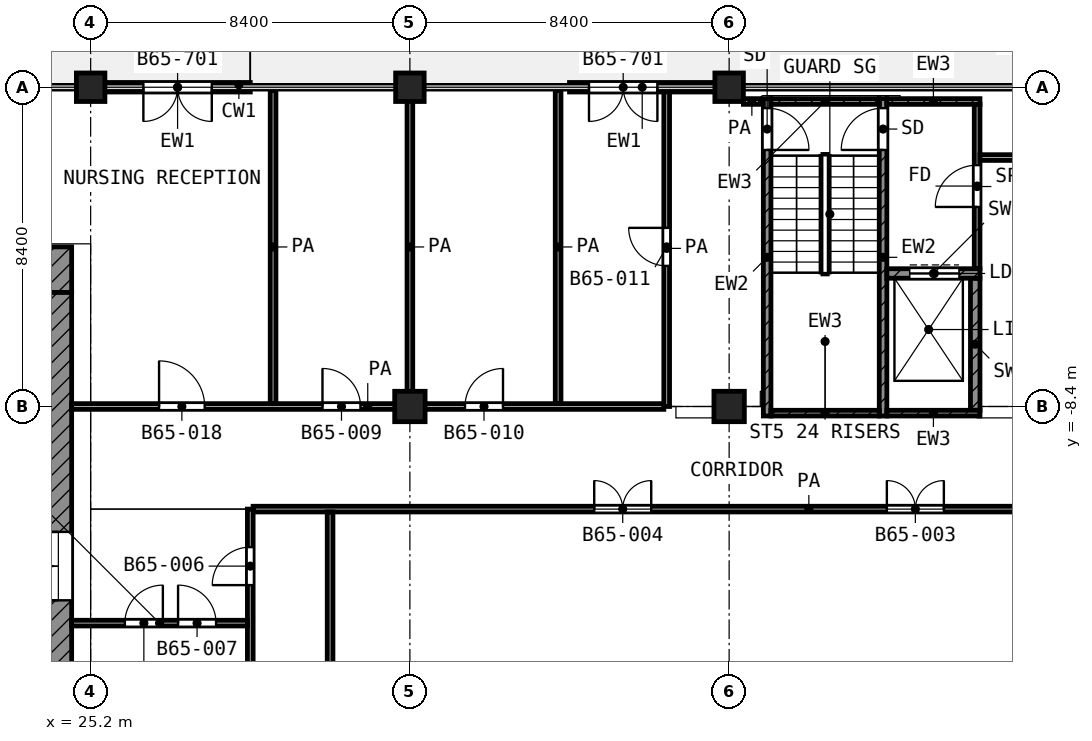
"""IFC4 building model, lengths in metres.
Left out: names, types, materials, properties, quantities, classifications, styles, units other than length and angle.
Written with IfcOpenShell. Run it as: python <this file> out.ifc"""

import sys

from ifc_helpers import new_model, si_unit, direction, frame, frame_2d, origin, origin_2d, place, context, subcontext, project, spatial, rectangle, extrude, element, fill, save


model = new_model("IFC4")
c1 = context("Model", 3, precision=1e-05, world=origin(), true_north=direction((0.0, 1.0)))
c2 = subcontext(c1, "Body", "Model", "MODEL_VIEW")
j1 = project(units=[si_unit("LENGTHUNIT", "METRE"), si_unit("PLANEANGLEUNIT", "RADIAN")], contexts=[c1])
p1 = place(None, origin())
s1 = spatial("IfcSite", under=j1, at=p1, CompositionType="ELEMENT")
p2 = place(p1, origin())
s2 = spatial("IfcBuilding", under=s1, at=p2, CompositionType="ELEMENT")
p3 = place(p2, frame((0.0, 0.0, 281.8)))
s3 = spatial("IfcBuildingStorey", under=s2, at=p3, CompositionType="ELEMENT", Elevation=281.8)
for number, where, z_axis, x_axis in (
    (1, (25.2, 0.0, 0.0), (0.0, 0.0, 1.0), (1.0, 0.0, 0.0)),
    (2, (33.6, 0.0, 0.0), (0.0, 0.0, 1.0), (1.0, 0.0, 0.0)),
    (3, (42.0, 0.0, 0.0), (0.0, 0.0, 1.0), (1.0, 0.0, 0.0)),
):
    element("IfcColumn", number, at=place(p3, frame(where, z_axis=z_axis, x_axis=x_axis)), inside=s3, PredefinedType="COLUMN", context=c2, shape_type="SweptSolid", body=[
        extrude(rectangle(XDim=0.75, YDim=0.75, at=origin_2d()), origin(), (0.0, 0.0, 1.0), 4.2),
    ])
for number, where, z_axis, x_axis in (
    (4, (33.6, -8.4, 0.0), (0.0, 0.0, 1.0), (1.0, 0.0, 0.0)),
    (5, (42.0, -8.4, 0.0), (0.0, 0.0, 1.0), (1.0, 0.0, 0.0)),
):
    element("IfcColumn", number, at=place(p3, frame(where, z_axis=z_axis, x_axis=x_axis)), inside=s3, PredefinedType="COLUMN", context=c2, shape_type="SweptSolid", body=[
        extrude(rectangle(XDim=0.8, YDim=0.8, at=origin_2d()), origin(), (0.0, 0.0, 1.0), 4.2),
    ])
p4 = place(p3, frame((41.625, 0.0, 0.0), z_axis=(0.0, 0.0, 1.0), x_axis=(-1.0, 0.0, 0.0)))
e6 = element("IfcWall", 6, at=p4, inside=s3, PredefinedType="SOLIDWALL", context=c2, shape_type="SweptSolid", body=[
    extrude(rectangle(XDim=3.825, YDim=0.25, at=frame_2d((1.913, 0.0))), origin(), (0.0, 0.0, 1.0), 3.48),
])
p5 = place(p4, frame((1.512, 0.0, 0.0)))
e7 = element("IfcOpeningElement", 7, at=p5, cuts=e6, PredefinedType="OPENING", context=c2, shape_type="SweptSolid", body=[
    extrude(rectangle(XDim=1.8, YDim=2.1, at=frame_2d((0.9, 1.05))), frame((0.0, 0.135, 0.0), z_axis=(0.0, -1.0, 0.0), x_axis=(1.0, 0.0, 0.0)), (0.0, 0.0, 1.0), 0.27),
])
p6 = place(p3, frame((29.4, 0.0, 0.0), z_axis=(0.0, 0.0, 1.0), x_axis=(-1.0, 0.0, 0.0)))
e8 = element("IfcWall", 8, at=p6, inside=s3, PredefinedType="SOLIDWALL", context=c2, shape_type="SweptSolid", body=[
    extrude(rectangle(XDim=3.825, YDim=0.25, at=frame_2d((1.913, 0.0))), origin(), (0.0, 0.0, 1.0), 3.48),
])
p7 = place(p6, frame((1.012, 0.0, 0.0)))
e9 = element("IfcOpeningElement", 9, at=p7, cuts=e8, PredefinedType="OPENING", context=c2, shape_type="SweptSolid", body=[
    extrude(rectangle(XDim=1.8, YDim=2.1, at=frame_2d((0.9, 1.05))), frame((0.0, 0.135, 0.0), z_axis=(0.0, -1.0, 0.0), x_axis=(1.0, 0.0, 0.0)), (0.0, 0.0, 1.0), 0.27),
])
p8 = place(p3, frame((4.2, -4.8, 0.0), z_axis=(0.0, 0.0, 1.0), x_axis=(1.0, 0.0, 0.0)))
e10 = element("IfcWall", 10, at=p8, inside=s3, PredefinedType="SHEAR", context=c2, shape_type="SweptSolid", body=[
    extrude(rectangle(XDim=20.5, YDim=1.2, at=frame_2d((10.25, 0.0))), origin(), (0.0, 0.0, 1.0), 3.6),
])
p9 = place(p8, frame((1.95, 0.0, 0.0)))
e11 = element("IfcOpeningElement", 11, at=p9, cuts=e10, PredefinedType="OPENING", context=c2, shape_type="SweptSolid", body=[
    extrude(rectangle(XDim=1.1, YDim=2.1, at=frame_2d((0.55, 1.05))), frame((0.0, 0.61, 0.0), z_axis=(0.0, -1.0, 0.0), x_axis=(1.0, 0.0, 0.0)), (0.0, 0.0, 1.0), 1.22),
])
p10 = place(p8, frame((17.95, 0.0, 0.0)))
e12 = element("IfcOpeningElement", 12, at=p10, cuts=e10, PredefinedType="OPENING", context=c2, shape_type="SweptSolid", body=[
    extrude(rectangle(XDim=1.1, YDim=2.1, at=frame_2d((0.55, 1.05))), frame((0.0, 0.61, 0.0), z_axis=(0.0, -1.0, 0.0), x_axis=(1.0, 0.0, 0.0)), (0.0, 0.0, 1.0), 1.22),
])
p11 = place(p3, frame((24.35, -24.0, 0.0), z_axis=(0.0, 0.0, 1.0), x_axis=(0.0, 1.0, 0.0)))
e13 = element("IfcWall", 13, at=p11, inside=s3, PredefinedType="SHEAR", context=c2, shape_type="SweptSolid", body=[
    extrude(rectangle(XDim=18.6, YDim=0.7, at=frame_2d((9.3, 0.0))), origin(), (0.0, 0.0, 1.0), 3.6),
])
p12 = place(p11, frame((10.5, 0.0, 0.0)))
e14 = element("IfcOpeningElement", 14, at=p12, cuts=e13, PredefinedType="OPENING", context=c2, shape_type="SweptSolid", body=[
    extrude(rectangle(XDim=1.8, YDim=2.1, at=frame_2d((0.9, 1.05))), frame((0.0, 0.36, 0.0), z_axis=(0.0, -1.0, 0.0), x_axis=(1.0, 0.0, 0.0)), (0.0, 0.0, 1.0), 0.72),
])
p13 = place(p3, frame((43.0, -8.65, 0.0), z_axis=(0.0, 0.0, 1.0), x_axis=(0.0, 1.0, 0.0)))
e15 = element("IfcWall", 15, at=p13, inside=s3, PredefinedType="SHEAR", context=c2, shape_type="SweptSolid", body=[
    extrude(rectangle(XDim=8.35, YDim=0.2, at=frame_2d((4.175, 0.0))), origin(), (0.0, 0.0, 1.0), 3.6),
])
p14 = place(p13, frame((7.0, 0.0, 0.0)))
e16 = element("IfcOpeningElement", 16, at=p14, cuts=e15, PredefinedType="OPENING", context=c2, shape_type="SweptSolid", body=[
    extrude(rectangle(XDim=1.1, YDim=2.1, at=frame_2d((0.55, 1.05))), frame((0.0, 0.11, 0.0), z_axis=(0.0, -1.0, 0.0), x_axis=(1.0, 0.0, 0.0)), (0.0, 0.0, 1.0), 0.22),
])
p15 = place(p3, frame((46.05, -8.65, 0.0), z_axis=(0.0, 0.0, 1.0), x_axis=(0.0, 1.0, 0.0)))
e17 = element("IfcWall", 17, at=p15, inside=s3, PredefinedType="SHEAR", context=c2, shape_type="SweptSolid", body=[
    extrude(rectangle(XDim=8.35, YDim=0.2, at=frame_2d((4.175, 0.0))), origin(), (0.0, 0.0, 1.0), 3.6),
])
p16 = place(p15, frame((7.0, 0.0, 0.0)))
e18 = element("IfcOpeningElement", 18, at=p16, cuts=e17, PredefinedType="OPENING", context=c2, shape_type="SweptSolid", body=[
    extrude(rectangle(XDim=1.1, YDim=2.1, at=frame_2d((0.55, 1.05))), frame((0.0, 0.11, 0.0), z_axis=(0.0, -1.0, 0.0), x_axis=(1.0, 0.0, 0.0)), (0.0, 0.0, 1.0), 0.22),
])
p17 = place(p3, frame((43.1, -0.375, 0.0), z_axis=(0.0, 0.0, 1.0), x_axis=(1.0, 0.0, 0.0)))
e19 = element("IfcWall", 19, at=p17, inside=s3, PredefinedType="SHEAR", context=c2, shape_type="SweptSolid", body=[
    extrude(rectangle(XDim=2.85, YDim=0.15, at=frame_2d((1.425, 0.0))), origin(), (0.0, 0.0, 1.0), 3.6),
])
p18 = place(p3, frame((46.15, -0.375, 0.0), z_axis=(0.0, 0.0, 1.0), x_axis=(1.0, 0.0, 0.0)))
e20 = element("IfcWall", 20, at=p18, inside=s3, PredefinedType="SHEAR", context=c2, shape_type="SweptSolid", body=[
    extrude(rectangle(XDim=2.45, YDim=0.15, at=frame_2d((1.225, 0.0))), origin(), (0.0, 0.0, 1.0), 3.6),
])
p19 = place(p3, frame((43.1, -8.575, 0.0), z_axis=(0.0, 0.0, 1.0), x_axis=(1.0, 0.0, 0.0)))
e21 = element("IfcWall", 21, at=p19, inside=s3, PredefinedType="SHEAR", context=c2, shape_type="SweptSolid", body=[
    extrude(rectangle(XDim=2.85, YDim=0.15, at=frame_2d((1.425, 0.0))), origin(), (0.0, 0.0, 1.0), 3.6),
])
p20 = place(p3, frame((46.15, -8.575, 0.0), z_axis=(0.0, 0.0, 1.0), x_axis=(1.0, 0.0, 0.0)))
e22 = element("IfcWall", 22, at=p20, inside=s3, PredefinedType="SHEAR", context=c2, shape_type="SweptSolid", body=[
    extrude(rectangle(XDim=2.45, YDim=0.15, at=frame_2d((1.225, 0.0))), origin(), (0.0, 0.0, 1.0), 3.6),
])
p21 = place(p3, frame((46.15, -4.9, 0.0), z_axis=(0.0, 0.0, 1.0), x_axis=(1.0, 0.0, 0.0)))
e23 = element("IfcWall", 23, at=p21, inside=s3, PredefinedType="SHEAR", context=c2, shape_type="SweptSolid", body=[
    extrude(rectangle(XDim=2.45, YDim=0.25, at=frame_2d((1.225, 0.0))), origin(), (0.0, 0.0, 1.0), 3.6),
])
p22 = place(p21, frame((0.6, 0.0, 0.0)))
e24 = element("IfcOpeningElement", 24, at=p22, cuts=e23, PredefinedType="OPENING", context=c2, shape_type="SweptSolid", body=[
    extrude(rectangle(XDim=1.3, YDim=2.1, at=frame_2d((0.65, 1.05))), frame((0.0, 0.135, 0.0), z_axis=(0.0, -1.0, 0.0), x_axis=(1.0, 0.0, 0.0)), (0.0, 0.0, 1.0), 0.27),
])
p23 = place(p3, frame((48.475, -8.5, 0.0), z_axis=(0.0, 0.0, 1.0), x_axis=(0.0, 1.0, 0.0)))
e25 = element("IfcWall", 25, at=p23, inside=s3, PredefinedType="SHEAR", context=c2, shape_type="SweptSolid", body=[
    extrude(rectangle(XDim=3.475, YDim=0.25, at=frame_2d((1.738, 0.0))), origin(), (0.0, 0.0, 1.0), 3.6),
])
p24 = place(p3, frame((48.525, -4.775, 0.0), z_axis=(0.0, 0.0, 1.0), x_axis=(0.0, 1.0, 0.0)))
e26 = element("IfcWall", 26, at=p24, inside=s3, PredefinedType="PARTITIONING", context=c2, shape_type="SweptSolid", body=[
    extrude(rectangle(XDim=4.325, YDim=0.15, at=frame_2d((2.163, 0.0))), origin(), (0.0, 0.0, 1.0), 3.6),
])
p25 = place(p24, frame((1.625, 0.0, 0.0)))
e27 = element("IfcOpeningElement", 27, at=p25, cuts=e26, PredefinedType="OPENING", context=c2, shape_type="SweptSolid", body=[
    extrude(rectangle(XDim=1.1, YDim=2.1, at=frame_2d((0.55, 1.05))), frame((0.0, 0.085, 0.0), z_axis=(0.0, -1.0, 0.0), x_axis=(1.0, 0.0, 0.0)), (0.0, 0.0, 1.0), 0.17),
])
p26 = place(p3, frame((24.7, -14.1, 0.0), z_axis=(0.0, 0.0, 1.0), x_axis=(1.0, 0.0, 0.0)))
e28 = element("IfcWall", 28, at=p26, inside=s3, PredefinedType="PARTITIONING", context=c2, shape_type="SweptSolid", body=[
    extrude(rectangle(XDim=4.625, YDim=0.15, at=frame_2d((2.312, 0.0))), origin(), (0.0, 0.0, 1.0), 3.6),
])
p27 = place(p26, frame((2.8, 0.0, 0.0)))
e29 = element("IfcOpeningElement", 29, at=p27, cuts=e28, PredefinedType="OPENING", context=c2, shape_type="SweptSolid", body=[
    extrude(rectangle(XDim=1.0, YDim=2.1, at=frame_2d((0.5, 1.05))), frame((0.0, 0.085, 0.0), z_axis=(0.0, -1.0, 0.0), x_axis=(1.0, 0.0, 0.0)), (0.0, 0.0, 1.0), 0.17),
])
p28 = place(p26, frame((1.4, 0.0, 0.0)))
e30 = element("IfcOpeningElement", 30, at=p28, cuts=e28, PredefinedType="OPENING", context=c2, shape_type="SweptSolid", body=[
    extrude(rectangle(XDim=1.0, YDim=2.1, at=frame_2d((0.5, 1.05))), frame((0.0, 0.085, 0.0), z_axis=(0.0, -1.0, 0.0), x_axis=(1.0, 0.0, 0.0)), (0.0, 0.0, 1.0), 0.17),
])
p29 = place(p3, frame((29.475, -11.1, 0.0), z_axis=(0.0, 0.0, 1.0), x_axis=(1.0, 0.0, 0.0)))
e31 = element("IfcWall", 31, at=p29, inside=s3, PredefinedType="PARTITIONING", context=c2, shape_type="SweptSolid", body=[
    extrude(rectangle(XDim=29.245, YDim=0.15, at=frame_2d((14.623, 0.0))), origin(), (0.0, 0.0, 1.0), 3.6),
])
p30 = place(p29, frame((26.725, 0.0, 0.0)))
e32 = element("IfcOpeningElement", 32, at=p30, cuts=e31, PredefinedType="OPENING", context=c2, shape_type="SweptSolid", body=[
    extrude(rectangle(XDim=1.0, YDim=2.1, at=frame_2d((0.5, 1.05))), frame((0.0, 0.085, 0.0), z_axis=(0.0, -1.0, 0.0), x_axis=(1.0, 0.0, 0.0)), (0.0, 0.0, 1.0), 0.17),
])
p31 = place(p29, frame((16.675, 0.0, 0.0)))
e33 = element("IfcOpeningElement", 33, at=p31, cuts=e31, PredefinedType="OPENING", context=c2, shape_type="SweptSolid", body=[
    extrude(rectangle(XDim=1.5, YDim=2.1, at=frame_2d((0.75, 1.05))), frame((0.0, 0.085, 0.0), z_axis=(0.0, -1.0, 0.0), x_axis=(1.0, 0.0, 0.0)), (0.0, 0.0, 1.0), 0.17),
])
p32 = place(p29, frame((8.975, 0.0, 0.0)))
e34 = element("IfcOpeningElement", 34, at=p32, cuts=e31, PredefinedType="OPENING", context=c2, shape_type="SweptSolid", body=[
    extrude(rectangle(XDim=1.5, YDim=2.1, at=frame_2d((0.75, 1.05))), frame((0.0, 0.085, 0.0), z_axis=(0.0, -1.0, 0.0), x_axis=(1.0, 0.0, 0.0)), (0.0, 0.0, 1.0), 0.17),
])
p33 = place(p3, frame((24.7, -8.4, 0.0), z_axis=(0.0, 0.0, 1.0), x_axis=(1.0, 0.0, 0.0)))
e35 = element("IfcWall", 35, at=p33, inside=s3, PredefinedType="PARTITIONING", context=c2, shape_type="SweptSolid", body=[
    extrude(rectangle(XDim=15.582, YDim=0.15, at=frame_2d((7.791, 0.0))), origin(), (0.0, 0.0, 1.0), 3.6),
])
p34 = place(p33, frame((2.3, 0.0, 0.0)))
e36 = element("IfcOpeningElement", 36, at=p34, cuts=e35, PredefinedType="OPENING", context=c2, shape_type="SweptSolid", body=[
    extrude(rectangle(XDim=1.2, YDim=2.1, at=frame_2d((0.6, 1.05))), frame((0.0, 0.085, 0.0), z_axis=(0.0, -1.0, 0.0), x_axis=(1.0, 0.0, 0.0)), (0.0, 0.0, 1.0), 0.17),
])
p35 = place(p33, frame((6.6, 0.0, 0.0)))
e37 = element("IfcOpeningElement", 37, at=p35, cuts=e35, PredefinedType="OPENING", context=c2, shape_type="SweptSolid", body=[
    extrude(rectangle(XDim=1.0, YDim=2.1, at=frame_2d((0.5, 1.05))), frame((0.0, 0.085, 0.0), z_axis=(0.0, -1.0, 0.0), x_axis=(1.0, 0.0, 0.0)), (0.0, 0.0, 1.0), 0.17),
])
p36 = place(p33, frame((10.35, 0.0, 0.0)))
e38 = element("IfcOpeningElement", 38, at=p36, cuts=e35, PredefinedType="OPENING", context=c2, shape_type="SweptSolid", body=[
    extrude(rectangle(XDim=1.0, YDim=2.1, at=frame_2d((0.5, 1.05))), frame((0.0, 0.085, 0.0), z_axis=(0.0, -1.0, 0.0), x_axis=(1.0, 0.0, 0.0)), (0.0, 0.0, 1.0), 0.17),
])
p37 = place(p3, frame((48.6, -1.85, 0.0), z_axis=(0.0, 0.0, 1.0), x_axis=(1.0, 0.0, 0.0)))
e39 = element("IfcWall", 39, at=p37, inside=s3, PredefinedType="PARTITIONING", context=c2, shape_type="SweptSolid", body=[
    extrude(rectangle(XDim=3.367, YDim=0.15, at=frame_2d((1.684, 0.0))), origin(), (0.0, 0.0, 1.0), 3.6),
])
p38 = place(p3, frame((42.376, -0.375, 0.0), z_axis=(0.0, 0.0, 1.0), x_axis=(1.0, 0.0, 0.0)))
e40 = element("IfcWall", 40, at=p38, inside=s3, PredefinedType="PARTITIONING", context=c2, shape_type="SweptSolid", body=[
    extrude(rectangle(XDim=0.444, YDim=0.15, at=frame_2d((0.222, 0.0))), origin(), (0.0, 0.0, 1.0), 3.6),
])
p39 = place(p3, frame((29.4, -31.198, 0.0), z_axis=(0.0, 0.0, 1.0), x_axis=(0.0, 1.0, 0.0)))
e41 = element("IfcWall", 41, at=p39, inside=s3, PredefinedType="PARTITIONING", context=c2, shape_type="SweptSolid", body=[
    extrude(rectangle(XDim=20.098, YDim=0.15, at=frame_2d((10.049, 0.0))), origin(), (0.0, 0.0, 1.0), 3.6),
])
p40 = place(p39, frame((18.098, 0.0, 0.0)))
e42 = element("IfcOpeningElement", 42, at=p40, cuts=e41, PredefinedType="OPENING", context=c2, shape_type="SweptSolid", body=[
    extrude(rectangle(XDim=1.0, YDim=2.1, at=frame_2d((0.5, 1.05))), frame((0.0, 0.085, 0.0), z_axis=(0.0, -1.0, 0.0), x_axis=(1.0, 0.0, 0.0)), (0.0, 0.0, 1.0), 0.17),
])
p41 = place(p3, frame((30.0, -8.325, 0.0), z_axis=(0.0, 0.0, 1.0), x_axis=(0.0, 1.0, 0.0)))
e43 = element("IfcWall", 43, at=p41, inside=s3, PredefinedType="PARTITIONING", context=c2, shape_type="SweptSolid", body=[
    extrude(rectangle(XDim=8.245, YDim=0.15, at=frame_2d((4.123, 0.0))), origin(), (0.0, 0.0, 1.0), 3.6),
])
p42 = place(p3, frame((31.5, -24.8, 0.0), z_axis=(0.0, 0.0, 1.0), x_axis=(0.0, 1.0, 0.0)))
e44 = element("IfcWall", 44, at=p42, inside=s3, PredefinedType="PARTITIONING", context=c2, shape_type="SweptSolid", body=[
    extrude(rectangle(XDim=13.625, YDim=0.15, at=frame_2d((6.812, 0.0))), origin(), (0.0, 0.0, 1.0), 3.6),
])
for number, where, z_axis, x_axis in (
    (45, (33.6, -8.325, 0.0), (0.0, 0.0, 1.0), (0.0, 1.0, 0.0)),
    (46, (37.5, -8.325, 0.0), (0.0, 0.0, 1.0), (0.0, 1.0, 0.0)),
):
    element("IfcWall", number, at=place(p3, frame(where, z_axis=z_axis, x_axis=x_axis)), inside=s3, PredefinedType="PARTITIONING", context=c2, shape_type="SweptSolid", body=[
        extrude(rectangle(XDim=8.245, YDim=0.15, at=frame_2d((4.123, 0.0))), origin(), (0.0, 0.0, 1.0), 3.6),
    ])
p43 = place(p3, frame((40.357, -8.4, 0.0), z_axis=(0.0, 0.0, 1.0), x_axis=(0.0, 1.0, 0.0)))
e47 = element("IfcWall", 47, at=p43, inside=s3, PredefinedType="PARTITIONING", context=c2, shape_type="SweptSolid", body=[
    extrude(rectangle(XDim=8.32, YDim=0.15, at=frame_2d((4.16, 0.0))), origin(), (0.0, 0.0, 1.0), 3.6),
])
p44 = place(p43, frame((3.7, 0.0, 0.0)))
e48 = element("IfcOpeningElement", 48, at=p44, cuts=e47, PredefinedType="OPENING", context=c2, shape_type="SweptSolid", body=[
    extrude(rectangle(XDim=1.0, YDim=2.1, at=frame_2d((0.5, 1.05))), frame((0.0, 0.085, 0.0), z_axis=(0.0, -1.0, 0.0), x_axis=(1.0, 0.0, 0.0)), (0.0, 0.0, 1.0), 0.17),
])
p45 = place(p5, origin())
e49 = element("IfcDoor", 49, at=p45, inside=s3, OperationType="DOUBLE_DOOR_SINGLE_SWING", PredefinedType="DOOR", context=c2, shape_type="SweptSolid", body=[
    extrude(rectangle(XDim=1.8, YDim=2.1, at=frame_2d((0.9, 1.05))), frame((0.0, 0.025, 0.0), z_axis=(0.0, -1.0, 0.0), x_axis=(1.0, 0.0, 0.0)), (0.0, 0.0, 1.0), 0.05),
])
fill(e7, e49)
p46 = place(p7, origin())
e50 = element("IfcDoor", 50, at=p46, inside=s3, OperationType="DOUBLE_DOOR_SINGLE_SWING", PredefinedType="DOOR", context=c2, shape_type="SweptSolid", body=[
    extrude(rectangle(XDim=1.8, YDim=2.1, at=frame_2d((0.9, 1.05))), frame((0.0, 0.025, 0.0), z_axis=(0.0, -1.0, 0.0), x_axis=(1.0, 0.0, 0.0)), (0.0, 0.0, 1.0), 0.05),
])
fill(e9, e50)
p47 = place(p12, origin())
e51 = element("IfcDoor", 51, at=p47, inside=s3, OperationType="DOUBLE_DOOR_SINGLE_SWING", PredefinedType="DOOR", context=c2, shape_type="SweptSolid", body=[
    extrude(rectangle(XDim=1.8, YDim=2.1, at=frame_2d((0.9, 1.05))), frame((0.0, 0.025, 0.0), z_axis=(0.0, -1.0, 0.0), x_axis=(1.0, 0.0, 0.0)), (0.0, 0.0, 1.0), 0.05),
])
fill(e14, e51)
p48 = place(p14, frame((1.1, 0.0, 0.0), z_axis=(0.0, 0.0, 1.0), x_axis=(-1.0, 0.0, 0.0)))
e52 = element("IfcDoor", 52, at=p48, inside=s3, OperationType="SINGLE_SWING_LEFT", PredefinedType="DOOR", context=c2, shape_type="SweptSolid", body=[
    extrude(rectangle(XDim=1.1, YDim=2.1, at=frame_2d((0.55, 1.05))), frame((0.0, 0.025, 0.0), z_axis=(0.0, -1.0, 0.0), x_axis=(1.0, 0.0, 0.0)), (0.0, 0.0, 1.0), 0.05),
])
fill(e16, e52)
p49 = place(p16, origin())
e53 = element("IfcDoor", 53, at=p49, inside=s3, OperationType="SINGLE_SWING_LEFT", PredefinedType="DOOR", context=c2, shape_type="SweptSolid", body=[
    extrude(rectangle(XDim=1.1, YDim=2.1, at=frame_2d((0.55, 1.05))), frame((0.0, 0.025, 0.0), z_axis=(0.0, -1.0, 0.0), x_axis=(1.0, 0.0, 0.0)), (0.0, 0.0, 1.0), 0.05),
])
fill(e18, e53)
p50 = place(p22, origin())
e54 = element("IfcDoor", 54, at=p50, inside=s3, OperationType="DOUBLE_DOOR_SLIDING", PredefinedType="DOOR", context=c2, shape_type="SweptSolid", body=[
    extrude(rectangle(XDim=1.3, YDim=2.1, at=frame_2d((0.65, 1.05))), frame((0.0, 0.025, 0.0), z_axis=(0.0, -1.0, 0.0), x_axis=(1.0, 0.0, 0.0)), (0.0, 0.0, 1.0), 0.05),
])
fill(e24, e54)
p51 = place(p25, origin())
e55 = element("IfcDoor", 55, at=p51, inside=s3, OperationType="SINGLE_SWING_LEFT", PredefinedType="DOOR", context=c2, shape_type="SweptSolid", body=[
    extrude(rectangle(XDim=1.1, YDim=2.1, at=frame_2d((0.55, 1.05))), frame((0.0, 0.025, 0.0), z_axis=(0.0, -1.0, 0.0), x_axis=(1.0, 0.0, 0.0)), (0.0, 0.0, 1.0), 0.05),
])
fill(e27, e55)
p52 = place(p27, origin())
e56 = element("IfcDoor", 56, at=p52, inside=s3, OperationType="SINGLE_SWING_LEFT", PredefinedType="DOOR", context=c2, shape_type="SweptSolid", body=[
    extrude(rectangle(XDim=1.0, YDim=2.1, at=frame_2d((0.5, 1.05))), frame((0.0, 0.025, 0.0), z_axis=(0.0, -1.0, 0.0), x_axis=(1.0, 0.0, 0.0)), (0.0, 0.0, 1.0), 0.05),
])
fill(e29, e56)
p53 = place(p28, origin())
e57 = element("IfcDoor", 57, at=p53, inside=s3, OperationType="SINGLE_SWING_RIGHT", PredefinedType="DOOR", context=c2, shape_type="SweptSolid", body=[
    extrude(rectangle(XDim=1.0, YDim=2.1, at=frame_2d((0.5, 1.05))), frame((0.0, 0.025, 0.0), z_axis=(0.0, -1.0, 0.0), x_axis=(1.0, 0.0, 0.0)), (0.0, 0.0, 1.0), 0.05),
])
fill(e30, e57)
p54 = place(p34, origin())
e58 = element("IfcDoor", 58, at=p54, inside=s3, OperationType="SINGLE_SWING_LEFT", PredefinedType="DOOR", context=c2, shape_type="SweptSolid", body=[
    extrude(rectangle(XDim=1.2, YDim=2.1, at=frame_2d((0.6, 1.05))), frame((0.0, 0.025, 0.0), z_axis=(0.0, -1.0, 0.0), x_axis=(1.0, 0.0, 0.0)), (0.0, 0.0, 1.0), 0.05),
])
fill(e36, e58)
p55 = place(p35, origin())
e59 = element("IfcDoor", 59, at=p55, inside=s3, OperationType="SINGLE_SWING_LEFT", PredefinedType="DOOR", context=c2, shape_type="SweptSolid", body=[
    extrude(rectangle(XDim=1.0, YDim=2.1, at=frame_2d((0.5, 1.05))), frame((0.0, 0.025, 0.0), z_axis=(0.0, -1.0, 0.0), x_axis=(1.0, 0.0, 0.0)), (0.0, 0.0, 1.0), 0.05),
])
fill(e37, e59)
p56 = place(p36, origin())
e60 = element("IfcDoor", 60, at=p56, inside=s3, OperationType="SINGLE_SWING_RIGHT", PredefinedType="DOOR", context=c2, shape_type="SweptSolid", body=[
    extrude(rectangle(XDim=1.0, YDim=2.1, at=frame_2d((0.5, 1.05))), frame((0.0, 0.025, 0.0), z_axis=(0.0, -1.0, 0.0), x_axis=(1.0, 0.0, 0.0)), (0.0, 0.0, 1.0), 0.05),
])
fill(e38, e60)
p57 = place(p44, origin())
e61 = element("IfcDoor", 61, at=p57, inside=s3, OperationType="SINGLE_SWING_RIGHT", PredefinedType="DOOR", context=c2, shape_type="SweptSolid", body=[
    extrude(rectangle(XDim=1.0, YDim=2.1, at=frame_2d((0.5, 1.05))), frame((0.0, 0.025, 0.0), z_axis=(0.0, -1.0, 0.0), x_axis=(1.0, 0.0, 0.0)), (0.0, 0.0, 1.0), 0.05),
])
fill(e48, e61)
p58 = place(p40, origin())
e62 = element("IfcDoor", 62, at=p58, inside=s3, OperationType="SINGLE_SWING_LEFT", PredefinedType="DOOR", context=c2, shape_type="SweptSolid", body=[
    extrude(rectangle(XDim=1.0, YDim=2.1, at=frame_2d((0.5, 1.05))), frame((0.0, 0.025, 0.0), z_axis=(0.0, -1.0, 0.0), x_axis=(1.0, 0.0, 0.0)), (0.0, 0.0, 1.0), 0.05),
])
fill(e42, e62)
p59 = place(p31, origin())
e63 = element("IfcDoor", 63, at=p59, inside=s3, OperationType="DOUBLE_DOOR_SINGLE_SWING", PredefinedType="DOOR", context=c2, shape_type="SweptSolid", body=[
    extrude(rectangle(XDim=1.5, YDim=2.1, at=frame_2d((0.75, 1.05))), frame((0.0, 0.025, 0.0), z_axis=(0.0, -1.0, 0.0), x_axis=(1.0, 0.0, 0.0)), (0.0, 0.0, 1.0), 0.05),
])
fill(e33, e63)
p60 = place(p32, origin())
e64 = element("IfcDoor", 64, at=p60, inside=s3, OperationType="DOUBLE_DOOR_SINGLE_SWING", PredefinedType="DOOR", context=c2, shape_type="SweptSolid", body=[
    extrude(rectangle(XDim=1.5, YDim=2.1, at=frame_2d((0.75, 1.05))), frame((0.0, 0.025, 0.0), z_axis=(0.0, -1.0, 0.0), x_axis=(1.0, 0.0, 0.0)), (0.0, 0.0, 1.0), 0.05),
])
fill(e34, e64)
save(model, sys.argv[1])
